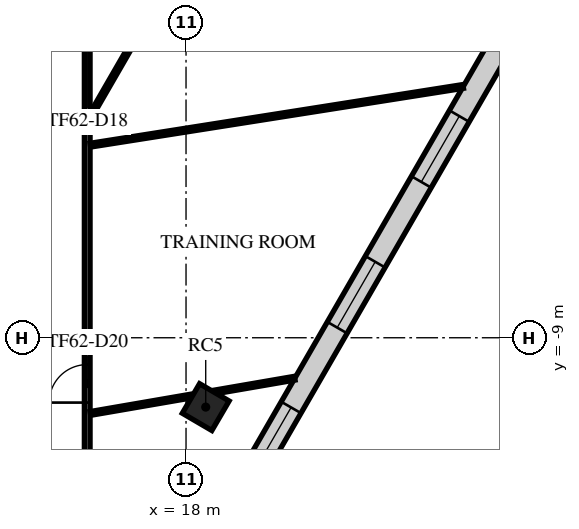
"""IFC4 building model, lengths in metres.
Left out: names, types, materials, properties, quantities, classifications, styles, units other than length and angle.
Written with IfcOpenShell. Run it as: python <this file> out.ifc"""

import sys

from ifc_helpers import new_model, si_unit, direction, frame, frame_2d, origin, origin_2d, place, context, subcontext, project, spatial, rectangle, extrude, element, fill, save


model = new_model("IFC4")
c1 = context("Model", 3, precision=1e-05, world=origin(), true_north=direction((0.0, 1.0)))
c2 = subcontext(c1, "Body", "Model", "MODEL_VIEW")
j1 = project(units=[si_unit("LENGTHUNIT", "METRE"), si_unit("PLANEANGLEUNIT", "RADIAN")], contexts=[c1])
p1 = place(None, origin())
s1 = spatial("IfcSite", under=j1, at=p1, CompositionType="ELEMENT")
p2 = place(p1, origin())
s2 = spatial("IfcBuilding", under=s1, at=p2, CompositionType="ELEMENT")
p3 = place(p2, frame((0.0, 0.0, 262.9)))
s3 = spatial("IfcBuildingStorey", under=s2, at=p3, CompositionType="ELEMENT", Elevation=262.9)
p4 = place(p3, frame((18.518, -10.825, 0.0), z_axis=(0.0, 0.0, 1.0), x_axis=(0.504643651291, 0.863327739165, 0.0)))
e1 = element("IfcColumn", 1, at=p4, inside=s3, PredefinedType="COLUMN", context=c2, shape_type="SweptSolid", body=[
    extrude(rectangle(XDim=0.9, YDim=0.9, at=origin_2d()), origin(), (0.0, 0.0, 1.0), 4.0),
])
p5 = place(p3, frame((8.094, -32.782, 0.0), z_axis=(0.0, 0.0, 1.0), x_axis=(0.499997945818, 0.866026589763, 0.0)))
e2 = element("IfcWall", 2, at=p5, inside=s3, PredefinedType="STANDARD", context=c2, shape_type="SweptSolid", body=[
    extrude(rectangle(XDim=48.686, YDim=0.6, at=frame_2d((24.343, 0.0))), origin(), (0.0, 0.0, 1.0), 3.64),
])
p6 = place(p5, frame((1.213, 0.0, 0.9)))
e3 = element("IfcOpeningElement", 3, at=p6, cuts=e2, PredefinedType="OPENING", context=c2, shape_type="SweptSolid", body=[
    extrude(rectangle(XDim=2.0, YDim=2.1, at=frame_2d((1.0, 1.05))), frame((0.0, 0.31, 0.0), z_axis=(0.0, -1.0, 0.0), x_axis=(1.0, 0.0, 0.0)), (0.0, 0.0, 1.0), 0.62),
])
p7 = place(p5, frame((5.639, 0.0, 0.9)))
e4 = element("IfcOpeningElement", 4, at=p7, cuts=e2, PredefinedType="OPENING", context=c2, shape_type="SweptSolid", body=[
    extrude(rectangle(XDim=2.0, YDim=2.1, at=frame_2d((1.0, 1.05))), frame((0.0, 0.31, 0.0), z_axis=(0.0, -1.0, 0.0), x_axis=(1.0, 0.0, 0.0)), (0.0, 0.0, 1.0), 0.62),
])
p8 = place(p5, frame((10.065, 0.0, 0.9)))
e5 = element("IfcOpeningElement", 5, at=p8, cuts=e2, PredefinedType="OPENING", context=c2, shape_type="SweptSolid", body=[
    extrude(rectangle(XDim=2.0, YDim=2.1, at=frame_2d((1.0, 1.05))), frame((0.0, 0.31, 0.0), z_axis=(0.0, -1.0, 0.0), x_axis=(1.0, 0.0, 0.0)), (0.0, 0.0, 1.0), 0.62),
])
p9 = place(p5, frame((14.491, 0.0, 0.9)))
e6 = element("IfcOpeningElement", 6, at=p9, cuts=e2, PredefinedType="OPENING", context=c2, shape_type="SweptSolid", body=[
    extrude(rectangle(XDim=2.0, YDim=2.1, at=frame_2d((1.0, 1.05))), frame((0.0, 0.31, 0.0), z_axis=(0.0, -1.0, 0.0), x_axis=(1.0, 0.0, 0.0)), (0.0, 0.0, 1.0), 0.62),
])
p10 = place(p5, frame((18.917, 0.0, 0.9)))
e7 = element("IfcOpeningElement", 7, at=p10, cuts=e2, PredefinedType="OPENING", context=c2, shape_type="SweptSolid", body=[
    extrude(rectangle(XDim=2.0, YDim=2.1, at=frame_2d((1.0, 1.05))), frame((0.0, 0.31, 0.0), z_axis=(0.0, -1.0, 0.0), x_axis=(1.0, 0.0, 0.0)), (0.0, 0.0, 1.0), 0.62),
])
p11 = place(p5, frame((23.343, 0.0, 0.9)))
e8 = element("IfcOpeningElement", 8, at=p11, cuts=e2, PredefinedType="OPENING", context=c2, shape_type="SweptSolid", body=[
    extrude(rectangle(XDim=2.0, YDim=2.1, at=frame_2d((1.0, 1.05))), frame((0.0, 0.31, 0.0), z_axis=(0.0, -1.0, 0.0), x_axis=(1.0, 0.0, 0.0)), (0.0, 0.0, 1.0), 0.62),
])
p12 = place(p5, frame((27.769, 0.0, 0.9)))
e9 = element("IfcOpeningElement", 9, at=p12, cuts=e2, PredefinedType="OPENING", context=c2, shape_type="SweptSolid", body=[
    extrude(rectangle(XDim=2.0, YDim=2.1, at=frame_2d((1.0, 1.05))), frame((0.0, 0.31, 0.0), z_axis=(0.0, -1.0, 0.0), x_axis=(1.0, 0.0, 0.0)), (0.0, 0.0, 1.0), 0.62),
])
p13 = place(p5, frame((32.195, 0.0, 0.9)))
e10 = element("IfcOpeningElement", 10, at=p13, cuts=e2, PredefinedType="OPENING", context=c2, shape_type="SweptSolid", body=[
    extrude(rectangle(XDim=2.0, YDim=2.1, at=frame_2d((1.0, 1.05))), frame((0.0, 0.31, 0.0), z_axis=(0.0, -1.0, 0.0), x_axis=(1.0, 0.0, 0.0)), (0.0, 0.0, 1.0), 0.62),
])
p14 = place(p5, frame((36.621, 0.0, 0.9)))
e11 = element("IfcOpeningElement", 11, at=p14, cuts=e2, PredefinedType="OPENING", context=c2, shape_type="SweptSolid", body=[
    extrude(rectangle(XDim=2.0, YDim=2.1, at=frame_2d((1.0, 1.05))), frame((0.0, 0.31, 0.0), z_axis=(0.0, -1.0, 0.0), x_axis=(1.0, 0.0, 0.0)), (0.0, 0.0, 1.0), 0.62),
])
p15 = place(p5, frame((41.047, 0.0, 0.9)))
e12 = element("IfcOpeningElement", 12, at=p15, cuts=e2, PredefinedType="OPENING", context=c2, shape_type="SweptSolid", body=[
    extrude(rectangle(XDim=2.0, YDim=2.1, at=frame_2d((1.0, 1.05))), frame((0.0, 0.31, 0.0), z_axis=(0.0, -1.0, 0.0), x_axis=(1.0, 0.0, 0.0)), (0.0, 0.0, 1.0), 0.62),
])
p16 = place(p5, frame((45.473, 0.0, 0.9)))
e13 = element("IfcOpeningElement", 13, at=p16, cuts=e2, PredefinedType="OPENING", context=c2, shape_type="SweptSolid", body=[
    extrude(rectangle(XDim=2.0, YDim=2.1, at=frame_2d((1.0, 1.05))), frame((0.0, 0.31, 0.0), z_axis=(0.0, -1.0, 0.0), x_axis=(1.0, 0.0, 0.0)), (0.0, 0.0, 1.0), 0.62),
])
p17 = place(p3, frame((15.4, -15.325, 0.0), z_axis=(0.0, 0.0, 1.0), x_axis=(0.0, 1.0, 0.0)))
e14 = element("IfcWall", 14, at=p17, inside=s3, PredefinedType="PARTITIONING", context=c2, shape_type="SweptSolid", body=[
    extrude(rectangle(XDim=26.175, YDim=0.15, at=frame_2d((13.087, 0.0))), origin(), (0.0, 0.0, 1.0), 3.24),
])
p18 = place(p17, frame((15.312, 0.0, 0.0)))
e15 = element("IfcOpeningElement", 15, at=p18, cuts=e14, PredefinedType="OPENING", context=c2, shape_type="SweptSolid", body=[
    extrude(rectangle(XDim=1.0, YDim=2.1, at=frame_2d((0.5, 1.05))), frame((0.0, 0.085, 0.0), z_axis=(0.0, -1.0, 0.0), x_axis=(1.0, 0.0, 0.0)), (0.0, 0.0, 1.0), 0.17),
])
p19 = place(p17, frame((4.619, 0.0, 0.0)))
e16 = element("IfcOpeningElement", 16, at=p19, cuts=e14, PredefinedType="OPENING", context=c2, shape_type="SweptSolid", body=[
    extrude(rectangle(XDim=1.0, YDim=2.1, at=frame_2d((0.5, 1.05))), frame((0.0, 0.085, 0.0), z_axis=(0.0, -1.0, 0.0), x_axis=(1.0, 0.0, 0.0)), (0.0, 0.0, 1.0), 0.17),
])
p20 = place(p3, frame((15.483, -10.992, 0.0), z_axis=(0.0, 0.0, 1.0), x_axis=(0.98545132529, 0.169957893267, 0.0)))
e17 = element("IfcWall", 17, at=p20, inside=s3, PredefinedType="PARTITIONING", context=c2, shape_type="SweptSolid", body=[
    extrude(rectangle(XDim=2.726, YDim=0.1, at=frame_2d((1.363, 0.0))), origin(), (0.0, 0.0, 1.0), 3.12),
])
p21 = place(p3, frame((15.483, -3.932, 0.0), z_axis=(0.0, 0.0, 1.0), x_axis=(0.987819108506, 0.155606583636, 0.0)))
e18 = element("IfcWall", 18, at=p21, inside=s3, PredefinedType="PARTITIONING", context=c2, shape_type="SweptSolid", body=[
    extrude(rectangle(XDim=9.932, YDim=0.1, at=frame_2d((4.966, 0.0))), origin(), (0.0, 0.0, 1.0), 3.04),
])
p22 = place(p3, frame((15.518, -3.108, 0.0), z_axis=(0.0, 0.0, 1.0), x_axis=(0.499989387739, 0.866031530689, 0.0)))
e19 = element("IfcWall", 19, at=p22, inside=s3, PredefinedType="PARTITIONING", context=c2, shape_type="SweptSolid", body=[
    extrude(rectangle(XDim=11.955, YDim=0.1, at=frame_2d((5.978, 0.0))), origin(), (0.0, 0.0, 1.0), 3.24),
])
p23 = place(p3, frame((18.735, -10.431, 0.0), z_axis=(0.0, 0.0, 1.0), x_axis=(0.985438538962, 0.170032014419, 0.0)))
e20 = element("IfcWall", 20, at=p23, inside=s3, PredefinedType="PARTITIONING", context=c2, shape_type="SweptSolid", body=[
    extrude(rectangle(XDim=2.157, YDim=0.1, at=frame_2d((1.078, 0.0))), origin(), (0.0, 0.0, 1.0), 3.04),
])
p24 = place(p11, origin())
e21 = element("IfcWindow", 21, at=p24, inside=s3, PartitioningType="SINGLE_PANEL", PredefinedType="WINDOW", context=c2, shape_type="SweptSolid", body=[
    extrude(rectangle(XDim=2.0, YDim=2.1, at=frame_2d((1.0, 1.05))), frame((0.0, 0.03, 0.0), z_axis=(0.0, -1.0, 0.0), x_axis=(1.0, 0.0, 0.0)), (0.0, 0.0, 1.0), 0.06),
])
fill(e8, e21)
p25 = place(p12, origin())
e22 = element("IfcWindow", 22, at=p25, inside=s3, PartitioningType="SINGLE_PANEL", PredefinedType="WINDOW", context=c2, shape_type="SweptSolid", body=[
    extrude(rectangle(XDim=2.0, YDim=2.1, at=frame_2d((1.0, 1.05))), frame((0.0, 0.03, 0.0), z_axis=(0.0, -1.0, 0.0), x_axis=(1.0, 0.0, 0.0)), (0.0, 0.0, 1.0), 0.06),
])
fill(e9, e22)
p26 = place(p13, origin())
e23 = element("IfcWindow", 23, at=p26, inside=s3, PartitioningType="SINGLE_PANEL", PredefinedType="WINDOW", context=c2, shape_type="SweptSolid", body=[
    extrude(rectangle(XDim=2.0, YDim=2.1, at=frame_2d((1.0, 1.05))), frame((0.0, 0.03, 0.0), z_axis=(0.0, -1.0, 0.0), x_axis=(1.0, 0.0, 0.0)), (0.0, 0.0, 1.0), 0.06),
])
fill(e10, e23)
p27 = place(p19, frame((1.0, 0.0, 0.0), z_axis=(0.0, 0.0, 1.0), x_axis=(-1.0, 0.0, 0.0)))
e24 = element("IfcDoor", 24, at=p27, inside=s3, OperationType="SINGLE_SWING_LEFT", PredefinedType="DOOR", context=c2, shape_type="SweptSolid", body=[
    extrude(rectangle(XDim=1.0, YDim=2.1, at=frame_2d((0.5, 1.05))), frame((0.0, 0.025, 0.0), z_axis=(0.0, -1.0, 0.0), x_axis=(1.0, 0.0, 0.0)), (0.0, 0.0, 1.0), 0.05),
])
fill(e16, e24)
save(model, sys.argv[1])
